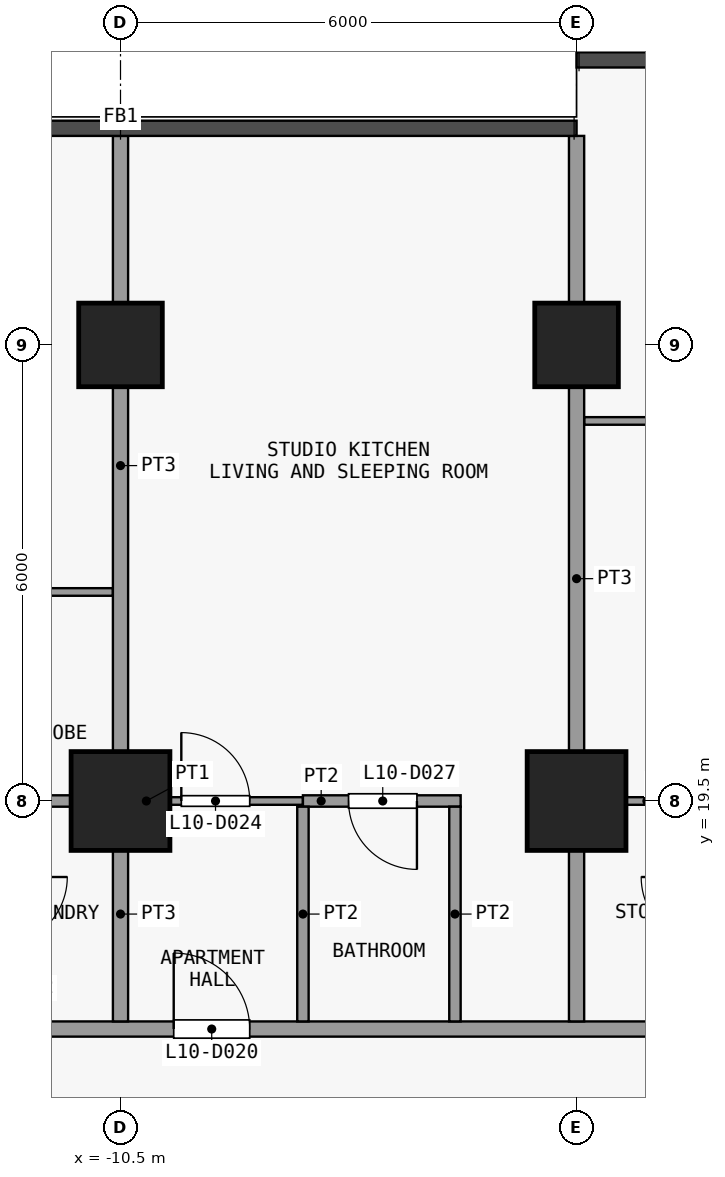
"""IFC4 building model, lengths in metres.
Left out: names, types, materials, properties, quantities, classifications, styles, units other than length and angle.
Written with IfcOpenShell. Run it as: python <this file> out.ifc"""

import sys

from ifc_helpers import new_model, si_unit, direction, frame, frame_2d, origin, origin_2d, place, context, subcontext, project, spatial, rectangle, extrude, element, fill, save


model = new_model("IFC4")
c1 = context("Model", 3, precision=1e-05, world=origin(), true_north=direction((0.0, 1.0)))
c2 = subcontext(c1, "Body", "Model", "MODEL_VIEW")
j1 = project(units=[si_unit("LENGTHUNIT", "METRE"), si_unit("PLANEANGLEUNIT", "RADIAN")], contexts=[c1])
p1 = place(None, origin())
s1 = spatial("IfcSite", under=j1, at=p1, CompositionType="ELEMENT")
p2 = place(p1, origin())
s2 = spatial("IfcBuilding", under=s1, at=p2, CompositionType="ELEMENT")
p3 = place(p2, frame((0.0, 0.0, 46.9)))
s3 = spatial("IfcBuildingStorey", under=s2, at=p3, CompositionType="ELEMENT", Elevation=46.9)
p4 = place(p3, frame((-10.5, 19.5, 0.0), z_axis=(0.0, 0.0, 1.0), x_axis=(1.0, 0.0, 0.0)))
e1 = element("IfcColumn", 1, at=p4, inside=s3, PredefinedType="COLUMN", context=c2, shape_type="SweptSolid", body=[
    extrude(rectangle(XDim=1.3, YDim=1.3, at=origin_2d()), origin(), (0.0, 0.0, 1.0), 3.6),
])
p5 = place(p3, frame((-10.5, 25.5, 0.0), z_axis=(0.0, 0.0, 1.0), x_axis=(1.0, 0.0, 0.0)))
e2 = element("IfcColumn", 2, at=p5, inside=s3, PredefinedType="COLUMN", context=c2, shape_type="SweptSolid", body=[
    extrude(rectangle(XDim=1.1, YDim=1.1, at=origin_2d()), origin(), (0.0, 0.0, 1.0), 3.6),
])
p6 = place(p3, frame((-4.5, 19.5, 0.0), z_axis=(0.0, 0.0, 1.0), x_axis=(1.0, 0.0, 0.0)))
e3 = element("IfcColumn", 3, at=p6, inside=s3, PredefinedType="COLUMN", context=c2, shape_type="SweptSolid", body=[
    extrude(rectangle(XDim=1.3, YDim=1.3, at=origin_2d()), origin(), (0.0, 0.0, 1.0), 3.6),
])
p7 = place(p3, frame((-4.5, 25.5, 0.0), z_axis=(0.0, 0.0, 1.0), x_axis=(1.0, 0.0, 0.0)))
e4 = element("IfcColumn", 4, at=p7, inside=s3, PredefinedType="COLUMN", context=c2, shape_type="SweptSolid", body=[
    extrude(rectangle(XDim=1.1, YDim=1.1, at=origin_2d()), origin(), (0.0, 0.0, 1.0), 3.6),
])
p8 = place(p3, frame((-25.35, 16.5, 0.0), z_axis=(0.0, 0.0, 1.0), x_axis=(1.0, 0.0, 0.0)))
e5 = element("IfcWall", 5, at=p8, inside=s3, PredefinedType="PARTITIONING", context=c2, shape_type="SweptSolid", body=[
    extrude(rectangle(XDim=50.7, YDim=0.2, at=frame_2d((25.35, 0.0))), origin(), (0.0, 0.0, 1.0), 3.3),
])
p9 = place(p8, frame((7.05, 0.0, 0.0)))
e6 = element("IfcOpeningElement", 6, at=p9, cuts=e5, PredefinedType="OPENING", context=c2, shape_type="SweptSolid", body=[
    extrude(rectangle(XDim=1.0, YDim=2.1, at=frame_2d((0.5, 1.05))), frame((0.0, 0.11, 0.0), z_axis=(0.0, -1.0, 0.0), x_axis=(1.0, 0.0, 0.0)), (0.0, 0.0, 1.0), 0.22),
])
p10 = place(p8, frame((15.55, 0.0, 0.0)))
e7 = element("IfcOpeningElement", 7, at=p10, cuts=e5, PredefinedType="OPENING", context=c2, shape_type="SweptSolid", body=[
    extrude(rectangle(XDim=1.0, YDim=2.1, at=frame_2d((0.5, 1.05))), frame((0.0, 0.11, 0.0), z_axis=(0.0, -1.0, 0.0), x_axis=(1.0, 0.0, 0.0)), (0.0, 0.0, 1.0), 0.22),
])
p11 = place(p8, frame((30.55, 0.0, 0.0)))
e8 = element("IfcOpeningElement", 8, at=p11, cuts=e5, PredefinedType="OPENING", context=c2, shape_type="SweptSolid", body=[
    extrude(rectangle(XDim=1.0, YDim=2.1, at=frame_2d((0.5, 1.05))), frame((0.0, 0.11, 0.0), z_axis=(0.0, -1.0, 0.0), x_axis=(1.0, 0.0, 0.0)), (0.0, 0.0, 1.0), 0.22),
])
p12 = place(p8, frame((45.05, 0.0, 0.0)))
e9 = element("IfcOpeningElement", 9, at=p12, cuts=e5, PredefinedType="OPENING", context=c2, shape_type="SweptSolid", body=[
    extrude(rectangle(XDim=1.0, YDim=2.1, at=frame_2d((0.5, 1.05))), frame((0.0, 0.11, 0.0), z_axis=(0.0, -1.0, 0.0), x_axis=(1.0, 0.0, 0.0)), (0.0, 0.0, 1.0), 0.22),
])
p13 = place(p3, frame((-10.5, 19.5, 0.0), z_axis=(0.0, 0.0, 1.0), x_axis=(1.0, 0.0, 0.0)))
e10 = element("IfcWall", 10, at=p13, inside=s3, PredefinedType="PARTITIONING", context=c2, shape_type="SweptSolid", body=[
    extrude(rectangle(XDim=2.4, YDim=0.1, at=frame_2d((1.2, 0.0))), origin(), (0.0, 0.0, 1.0), 3.3),
])
p14 = place(p13, frame((0.8, 0.0, 0.0)))
e11 = element("IfcOpeningElement", 11, at=p14, cuts=e10, PredefinedType="OPENING", context=c2, shape_type="SweptSolid", body=[
    extrude(rectangle(XDim=0.9, YDim=2.1, at=frame_2d((0.45, 1.05))), frame((0.0, 0.06, 0.0), z_axis=(0.0, -1.0, 0.0), x_axis=(1.0, 0.0, 0.0)), (0.0, 0.0, 1.0), 0.12),
])
p15 = place(p3, frame((-4.4, 19.5, 0.0), z_axis=(0.0, 0.0, 1.0), x_axis=(1.0, 0.0, 0.0)))
e12 = element("IfcWall", 12, at=p15, inside=s3, PredefinedType="PARTITIONING", context=c2, shape_type="SweptSolid", body=[
    extrude(rectangle(XDim=1.65, YDim=0.1, at=frame_2d((0.825, 0.0))), origin(), (0.0, 0.0, 1.0), 3.3),
])
p16 = place(p3, frame((-13.6, 19.5, 0.0), z_axis=(0.0, 0.0, 1.0), x_axis=(1.0, 0.0, 0.0)))
e13 = element("IfcWall", 13, at=p16, inside=s3, PredefinedType="PARTITIONING", context=c2, shape_type="SweptSolid", body=[
    extrude(rectangle(XDim=3.1, YDim=0.15, at=frame_2d((1.55, 0.0))), origin(), (0.0, 0.0, 1.0), 3.3),
])
p17 = place(p3, frame((-8.1, 19.5, 0.0), z_axis=(0.0, 0.0, 1.0), x_axis=(1.0, 0.0, 0.0)))
e14 = element("IfcWall", 14, at=p17, inside=s3, PredefinedType="PARTITIONING", context=c2, shape_type="SweptSolid", body=[
    extrude(rectangle(XDim=2.075, YDim=0.15, at=frame_2d((1.038, 0.0))), origin(), (0.0, 0.0, 1.0), 3.3),
])
p18 = place(p17, frame((0.6, 0.0, 0.0)))
e15 = element("IfcOpeningElement", 15, at=p18, cuts=e14, PredefinedType="OPENING", context=c2, shape_type="SweptSolid", body=[
    extrude(rectangle(XDim=0.9, YDim=2.1, at=frame_2d((0.45, 1.05))), frame((0.0, 0.085, 0.0), z_axis=(0.0, -1.0, 0.0), x_axis=(1.0, 0.0, 0.0)), (0.0, 0.0, 1.0), 0.17),
])
p19 = place(p3, frame((-13.8, 22.25, 0.0), z_axis=(0.0, 0.0, 1.0), x_axis=(1.0, 0.0, 0.0)))
e16 = element("IfcWall", 16, at=p19, inside=s3, PredefinedType="PARTITIONING", context=c2, shape_type="SweptSolid", body=[
    extrude(rectangle(XDim=3.2, YDim=0.1, at=frame_2d((1.6, 0.0))), origin(), (0.0, 0.0, 1.0), 3.3),
])
p20 = place(p19, frame((1.2, 0.0, 0.0)))
e17 = element("IfcOpeningElement", 17, at=p20, cuts=e16, PredefinedType="OPENING", context=c2, shape_type="SweptSolid", body=[
    extrude(rectangle(XDim=0.9, YDim=2.1, at=frame_2d((0.45, 1.05))), frame((0.0, 0.06, 0.0), z_axis=(0.0, -1.0, 0.0), x_axis=(1.0, 0.0, 0.0)), (0.0, 0.0, 1.0), 0.12),
])
p21 = place(p3, frame((-4.4, 24.5, 0.0), z_axis=(0.0, 0.0, 1.0), x_axis=(1.0, 0.0, 0.0)))
e18 = element("IfcWall", 18, at=p21, inside=s3, PredefinedType="PARTITIONING", context=c2, shape_type="SweptSolid", body=[
    extrude(rectangle(XDim=8.85, YDim=0.1, at=frame_2d((4.425, 0.0))), origin(), (0.0, 0.0, 1.0), 3.3),
])
p22 = place(p21, frame((4.0, 0.0, 0.0)))
e19 = element("IfcOpeningElement", 19, at=p22, cuts=e18, PredefinedType="OPENING", context=c2, shape_type="SweptSolid", body=[
    extrude(rectangle(XDim=0.9, YDim=2.1, at=frame_2d((0.45, 1.05))), frame((0.0, 0.06, 0.0), z_axis=(0.0, -1.0, 0.0), x_axis=(1.0, 0.0, 0.0)), (0.0, 0.0, 1.0), 0.12),
])
p23 = place(p3, frame((-10.5, 16.6, 0.0), z_axis=(0.0, 0.0, 1.0), x_axis=(0.0, 1.0, 0.0)))
e20 = element("IfcWall", 20, at=p23, inside=s3, PredefinedType="PARTITIONING", context=c2, shape_type="SweptSolid", body=[
    extrude(rectangle(XDim=2.825, YDim=0.2, at=frame_2d((1.413, 0.0))), origin(), (0.0, 0.0, 1.0), 3.3),
])
p24 = place(p3, frame((-10.5, 19.575, 0.0), z_axis=(0.0, 0.0, 1.0), x_axis=(0.0, 1.0, 0.0)))
e21 = element("IfcWall", 21, at=p24, inside=s3, PredefinedType="PARTITIONING", context=c2, shape_type="SweptSolid", body=[
    extrude(rectangle(XDim=8.675, YDim=0.2, at=frame_2d((4.337, 0.0))), origin(), (0.0, 0.0, 1.0), 3.3),
])
for number, where, z_axis, x_axis in (
    (22, (-8.1, 16.6, 0.0), (0.0, 0.0, 1.0), (0.0, 1.0, 0.0)),
    (23, (-6.1, 16.6, 0.0), (0.0, 0.0, 1.0), (0.0, 1.0, 0.0)),
):
    element("IfcWall", number, at=place(p3, frame(where, z_axis=z_axis, x_axis=x_axis)), inside=s3, PredefinedType="PARTITIONING", context=c2, shape_type="SweptSolid", body=[
        extrude(rectangle(XDim=2.825, YDim=0.15, at=frame_2d((1.413, 0.0))), origin(), (0.0, 0.0, 1.0), 3.3),
    ])
p25 = place(p3, frame((-4.5, 16.6, 0.0), z_axis=(0.0, 0.0, 1.0), x_axis=(0.0, 1.0, 0.0)))
e24 = element("IfcWall", 24, at=p25, inside=s3, PredefinedType="PARTITIONING", context=c2, shape_type="SweptSolid", body=[
    extrude(rectangle(XDim=11.65, YDim=0.2, at=frame_2d((5.825, 0.0))), origin(), (0.0, 0.0, 1.0), 3.3),
])
p26 = place(p10, origin())
e25 = element("IfcDoor", 25, at=p26, inside=s3, OperationType="SINGLE_SWING_RIGHT", PredefinedType="DOOR", context=c2, shape_type="SweptSolid", body=[
    extrude(rectangle(XDim=1.0, YDim=2.1, at=frame_2d((0.5, 1.05))), frame((0.0, 0.025, 0.0), z_axis=(0.0, -1.0, 0.0), x_axis=(1.0, 0.0, 0.0)), (0.0, 0.0, 1.0), 0.05),
])
fill(e7, e25)
p27 = place(p14, origin())
e26 = element("IfcDoor", 26, at=p27, inside=s3, OperationType="SINGLE_SWING_RIGHT", PredefinedType="DOOR", context=c2, shape_type="SweptSolid", body=[
    extrude(rectangle(XDim=0.9, YDim=2.1, at=frame_2d((0.45, 1.05))), frame((0.0, 0.025, 0.0), z_axis=(0.0, -1.0, 0.0), x_axis=(1.0, 0.0, 0.0)), (0.0, 0.0, 1.0), 0.05),
])
fill(e11, e26)
p28 = place(p18, origin())
e27 = element("IfcDoor", 27, at=p28, inside=s3, OperationType="SINGLE_SWING_RIGHT", PredefinedType="DOOR", context=c2, shape_type="SweptSolid", body=[
    extrude(rectangle(XDim=0.9, YDim=2.1, at=frame_2d((0.45, 1.05))), frame((0.0, 0.025, 0.0), z_axis=(0.0, -1.0, 0.0), x_axis=(1.0, 0.0, 0.0)), (0.0, 0.0, 1.0), 0.05),
])
fill(e15, e27)
save(model, sys.argv[1])
